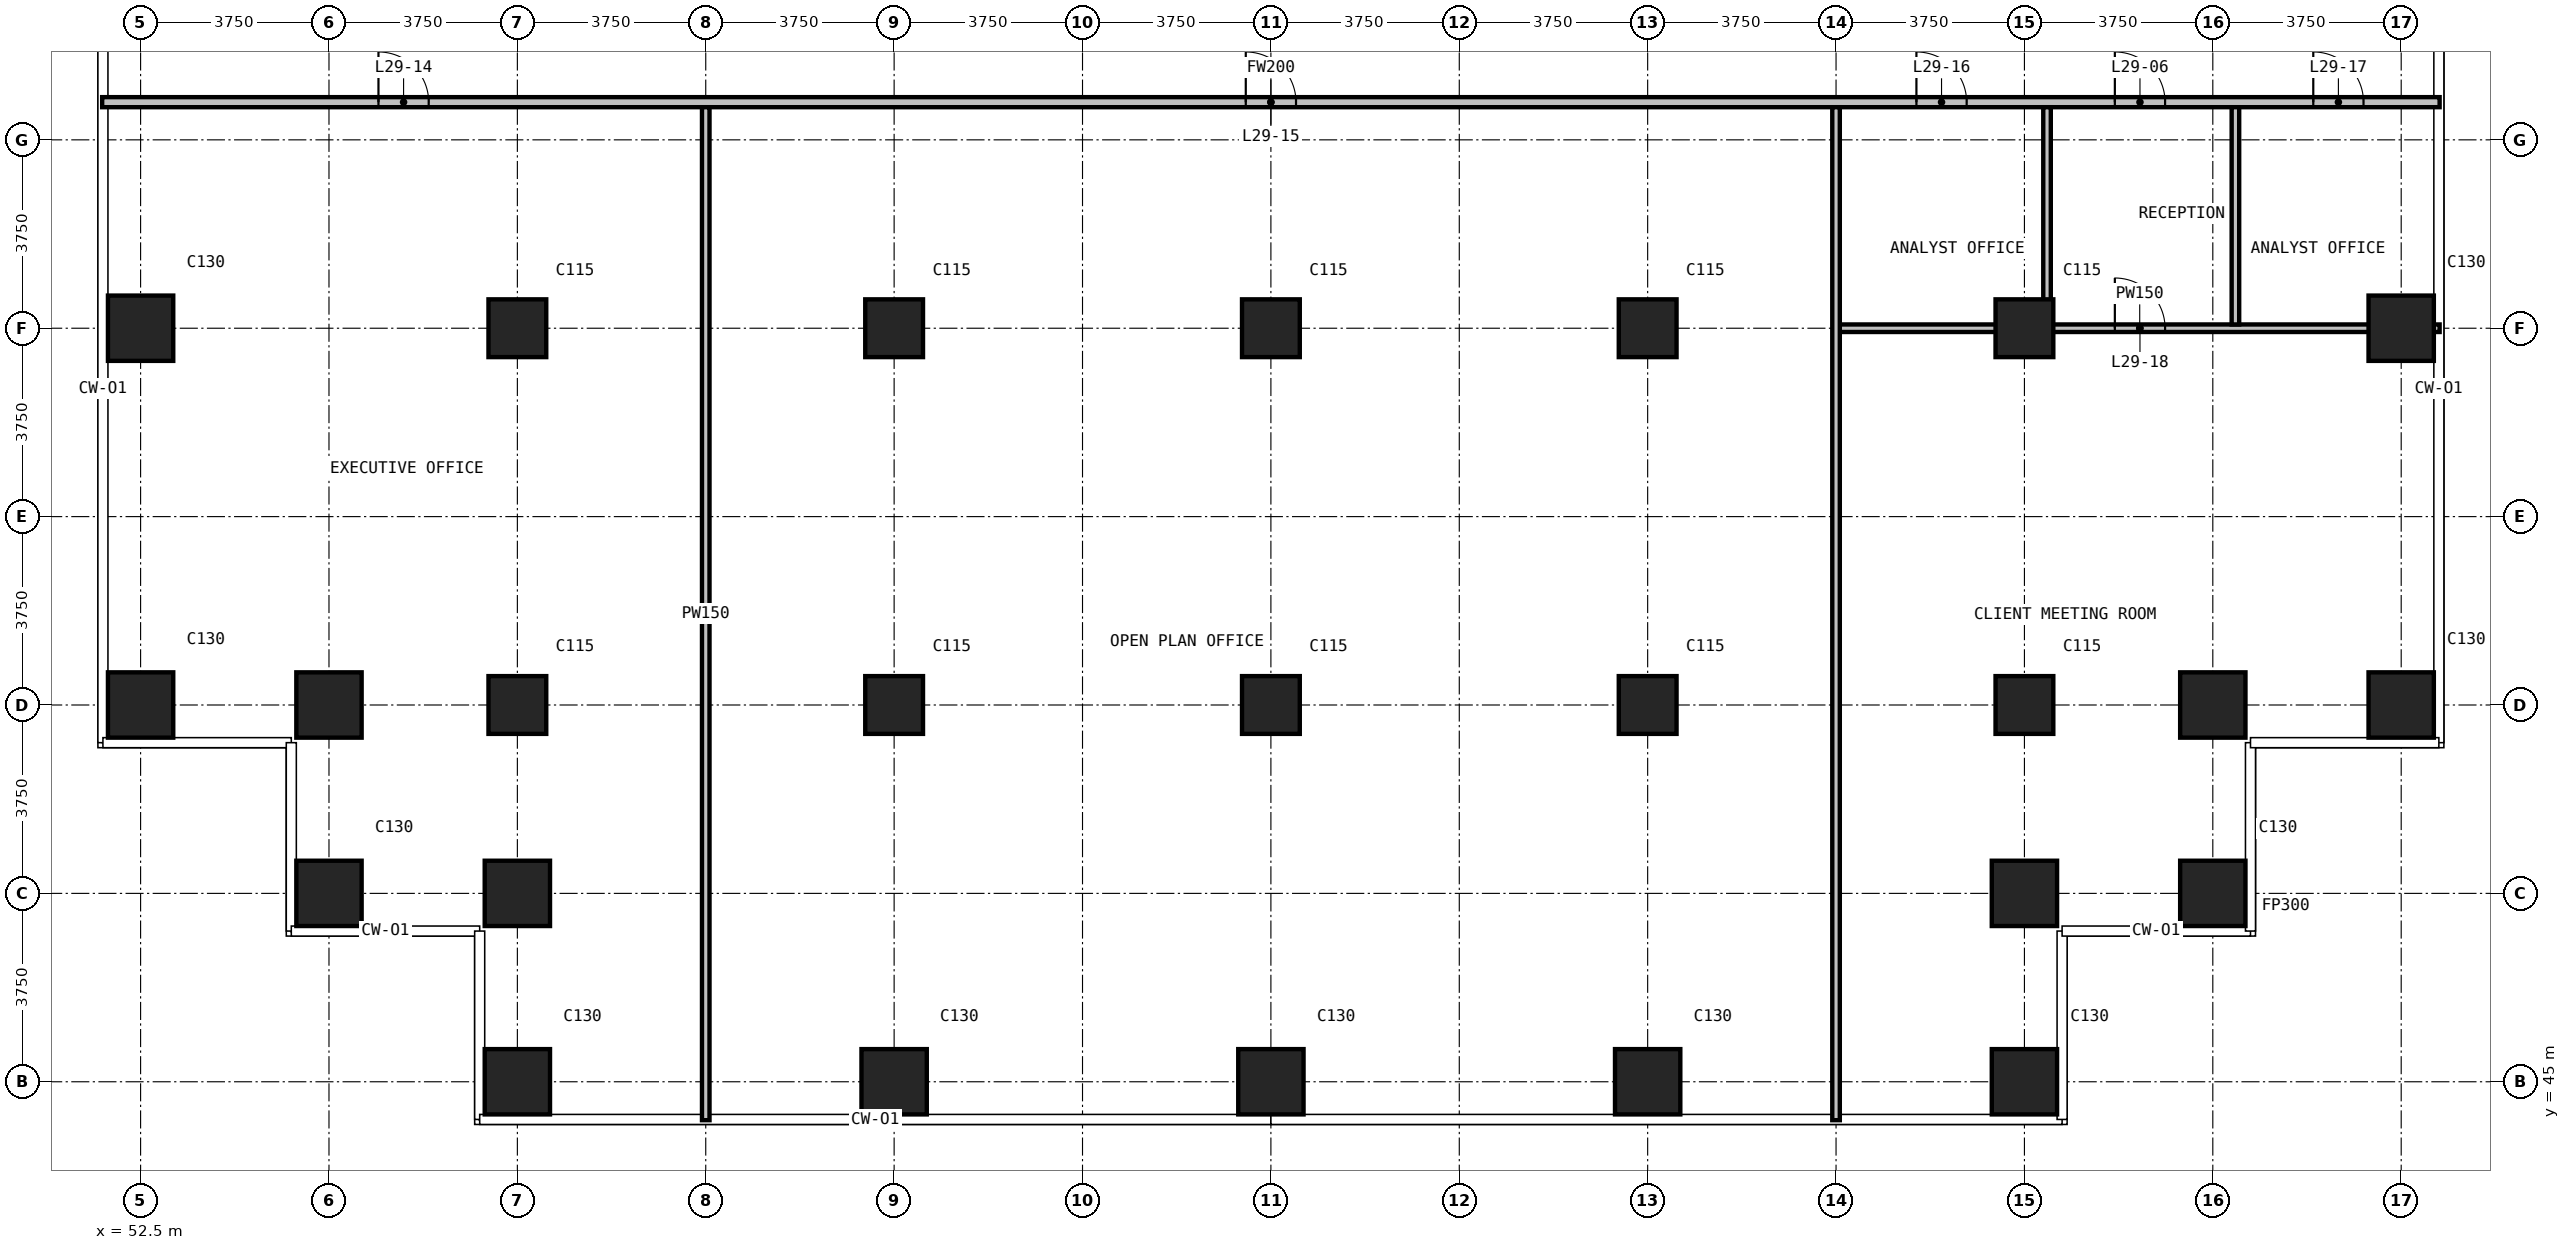
"""IFC4 building model, lengths in metres.
Left out: names, types, materials, properties, quantities, classifications, styles, units other than length and angle.
Written with IfcOpenShell. Run it as: python <this file> out.ifc"""

import sys

from ifc_helpers import new_model, si_unit, direction, frame, frame_2d, origin, origin_2d, place, context, subcontext, project, spatial, rectangle, extrude, element, fill, save


model = new_model("IFC4")
c1 = context("Model", 3, precision=1e-05, world=origin(), true_north=direction((0.0, 1.0)))
c2 = subcontext(c1, "Body", "Model", "MODEL_VIEW")
j1 = project(units=[si_unit("LENGTHUNIT", "METRE"), si_unit("PLANEANGLEUNIT", "RADIAN")], contexts=[c1])
p1 = place(None, origin())
s1 = spatial("IfcSite", under=j1, at=p1, CompositionType="ELEMENT")
p2 = place(p1, origin())
s2 = spatial("IfcBuilding", under=s1, at=p2, CompositionType="ELEMENT")
p3 = place(p2, frame((0.0, 0.0, 118.0)))
s3 = spatial("IfcBuildingStorey", under=s2, at=p3, CompositionType="ELEMENT", Elevation=118.0)
for number, where, z_axis, x_axis in (
    (1, (52.5, 52.5, 0.0), (0.0, 0.0, 1.0), (1.0, 0.0, 0.0)),
    (2, (52.5, 60.0, 0.0), (0.0, 0.0, 1.0), (1.0, 0.0, 0.0)),
    (3, (56.25, 48.75, 0.0), (0.0, 0.0, 1.0), (1.0, 0.0, 0.0)),
    (4, (56.25, 52.5, 0.0), (0.0, 0.0, 1.0), (1.0, 0.0, 0.0)),
    (5, (60.0, 45.0, 0.0), (0.0, 0.0, 1.0), (1.0, 0.0, 0.0)),
    (6, (60.0, 48.75, 0.0), (0.0, 0.0, 1.0), (1.0, 0.0, 0.0)),
):
    element("IfcColumn", number, at=place(p3, frame(where, z_axis=z_axis, x_axis=x_axis)), inside=s3, PredefinedType="COLUMN", context=c2, shape_type="SweptSolid", body=[
        extrude(rectangle(XDim=1.3, YDim=1.3, at=origin_2d()), origin(), (0.0, 0.0, 1.0), 3.6),
    ])
for number, where, z_axis, x_axis in (
    (7, (60.0, 52.5, 0.0), (0.0, 0.0, 1.0), (1.0, 0.0, 0.0)),
    (8, (60.0, 60.0, 0.0), (0.0, 0.0, 1.0), (1.0, 0.0, 0.0)),
):
    element("IfcColumn", number, at=place(p3, frame(where, z_axis=z_axis, x_axis=x_axis)), inside=s3, PredefinedType="COLUMN", context=c2, shape_type="SweptSolid", body=[
        extrude(rectangle(XDim=1.15, YDim=1.15, at=origin_2d()), origin(), (0.0, 0.0, 1.0), 3.6),
    ])
p4 = place(p3, frame((67.5, 45.0, 0.0), z_axis=(0.0, 0.0, 1.0), x_axis=(1.0, 0.0, 0.0)))
e9 = element("IfcColumn", 9, at=p4, inside=s3, PredefinedType="COLUMN", context=c2, shape_type="SweptSolid", body=[
    extrude(rectangle(XDim=1.3, YDim=1.3, at=origin_2d()), origin(), (0.0, 0.0, 1.0), 3.6),
])
for number, where, z_axis, x_axis in (
    (10, (67.5, 52.5, 0.0), (0.0, 0.0, 1.0), (1.0, 0.0, 0.0)),
    (11, (67.5, 60.0, 0.0), (0.0, 0.0, 1.0), (1.0, 0.0, 0.0)),
):
    element("IfcColumn", number, at=place(p3, frame(where, z_axis=z_axis, x_axis=x_axis)), inside=s3, PredefinedType="COLUMN", context=c2, shape_type="SweptSolid", body=[
        extrude(rectangle(XDim=1.15, YDim=1.15, at=origin_2d()), origin(), (0.0, 0.0, 1.0), 3.6),
    ])
p5 = place(p3, frame((75.0, 45.0, 0.0), z_axis=(0.0, 0.0, 1.0), x_axis=(1.0, 0.0, 0.0)))
e12 = element("IfcColumn", 12, at=p5, inside=s3, PredefinedType="COLUMN", context=c2, shape_type="SweptSolid", body=[
    extrude(rectangle(XDim=1.3, YDim=1.3, at=origin_2d()), origin(), (0.0, 0.0, 1.0), 3.6),
])
for number, where, z_axis, x_axis in (
    (13, (75.0, 52.5, 0.0), (0.0, 0.0, 1.0), (1.0, 0.0, 0.0)),
    (14, (75.0, 60.0, 0.0), (0.0, 0.0, 1.0), (1.0, 0.0, 0.0)),
):
    element("IfcColumn", number, at=place(p3, frame(where, z_axis=z_axis, x_axis=x_axis)), inside=s3, PredefinedType="COLUMN", context=c2, shape_type="SweptSolid", body=[
        extrude(rectangle(XDim=1.15, YDim=1.15, at=origin_2d()), origin(), (0.0, 0.0, 1.0), 3.6),
    ])
p6 = place(p3, frame((82.5, 45.0, 0.0), z_axis=(0.0, 0.0, 1.0), x_axis=(1.0, 0.0, 0.0)))
e15 = element("IfcColumn", 15, at=p6, inside=s3, PredefinedType="COLUMN", context=c2, shape_type="SweptSolid", body=[
    extrude(rectangle(XDim=1.3, YDim=1.3, at=origin_2d()), origin(), (0.0, 0.0, 1.0), 3.6),
])
for number, where, z_axis, x_axis in (
    (16, (82.5, 52.5, 0.0), (0.0, 0.0, 1.0), (1.0, 0.0, 0.0)),
    (17, (82.5, 60.0, 0.0), (0.0, 0.0, 1.0), (1.0, 0.0, 0.0)),
):
    element("IfcColumn", number, at=place(p3, frame(where, z_axis=z_axis, x_axis=x_axis)), inside=s3, PredefinedType="COLUMN", context=c2, shape_type="SweptSolid", body=[
        extrude(rectangle(XDim=1.15, YDim=1.15, at=origin_2d()), origin(), (0.0, 0.0, 1.0), 3.6),
    ])
for number, where, z_axis, x_axis in (
    (18, (90.0, 45.0, 0.0), (0.0, 0.0, 1.0), (1.0, 0.0, 0.0)),
    (19, (90.0, 48.75, 0.0), (0.0, 0.0, 1.0), (1.0, 0.0, 0.0)),
):
    element("IfcColumn", number, at=place(p3, frame(where, z_axis=z_axis, x_axis=x_axis)), inside=s3, PredefinedType="COLUMN", context=c2, shape_type="SweptSolid", body=[
        extrude(rectangle(XDim=1.3, YDim=1.3, at=origin_2d()), origin(), (0.0, 0.0, 1.0), 3.6),
    ])
for number, where, z_axis, x_axis in (
    (20, (90.0, 52.5, 0.0), (0.0, 0.0, 1.0), (1.0, 0.0, 0.0)),
    (21, (90.0, 60.0, 0.0), (0.0, 0.0, 1.0), (1.0, 0.0, 0.0)),
):
    element("IfcColumn", number, at=place(p3, frame(where, z_axis=z_axis, x_axis=x_axis)), inside=s3, PredefinedType="COLUMN", context=c2, shape_type="SweptSolid", body=[
        extrude(rectangle(XDim=1.15, YDim=1.15, at=origin_2d()), origin(), (0.0, 0.0, 1.0), 3.6),
    ])
for number, where, z_axis, x_axis in (
    (22, (93.75, 48.75, 0.0), (0.0, 0.0, 1.0), (1.0, 0.0, 0.0)),
    (23, (93.75, 52.5, 0.0), (0.0, 0.0, 1.0), (1.0, 0.0, 0.0)),
    (24, (97.5, 52.5, 0.0), (0.0, 0.0, 1.0), (1.0, 0.0, 0.0)),
    (25, (97.5, 60.0, 0.0), (0.0, 0.0, 1.0), (1.0, 0.0, 0.0)),
):
    element("IfcColumn", number, at=place(p3, frame(where, z_axis=z_axis, x_axis=x_axis)), inside=s3, PredefinedType="COLUMN", context=c2, shape_type="SweptSolid", body=[
        extrude(rectangle(XDim=1.3, YDim=1.3, at=origin_2d()), origin(), (0.0, 0.0, 1.0), 3.6),
    ])
p7 = place(p3, frame((51.735, 64.5, 0.0), z_axis=(0.0, 0.0, 1.0), x_axis=(1.0, 0.0, 0.0)))
e26 = element("IfcWall", 26, at=p7, inside=s3, PredefinedType="PARTITIONING", context=c2, shape_type="SweptSolid", body=[
    extrude(rectangle(XDim=46.53, YDim=0.2, at=frame_2d((23.265, 0.0))), origin(), (0.0, 0.0, 1.0), 3.3),
])
p8 = place(p7, frame((40.065, 0.0, 0.0)))
e27 = element("IfcOpeningElement", 27, at=p8, cuts=e26, PredefinedType="OPENING", context=c2, shape_type="SweptSolid", body=[
    extrude(rectangle(XDim=1.0, YDim=2.2, at=frame_2d((0.5, 1.1))), frame((0.0, 0.11, 0.0), z_axis=(0.0, -1.0, 0.0), x_axis=(1.0, 0.0, 0.0)), (0.0, 0.0, 1.0), 0.22),
])
p9 = place(p7, frame((5.5, 0.0, 0.0)))
e28 = element("IfcOpeningElement", 28, at=p9, cuts=e26, PredefinedType="OPENING", context=c2, shape_type="SweptSolid", body=[
    extrude(rectangle(XDim=1.0, YDim=2.2, at=frame_2d((0.5, 1.1))), frame((0.0, 0.11, 0.0), z_axis=(0.0, -1.0, 0.0), x_axis=(1.0, 0.0, 0.0)), (0.0, 0.0, 1.0), 0.22),
])
p10 = place(p7, frame((22.765, 0.0, 0.0)))
e29 = element("IfcOpeningElement", 29, at=p10, cuts=e26, PredefinedType="OPENING", context=c2, shape_type="SweptSolid", body=[
    extrude(rectangle(XDim=1.0, YDim=2.2, at=frame_2d((0.5, 1.1))), frame((0.0, 0.11, 0.0), z_axis=(0.0, -1.0, 0.0), x_axis=(1.0, 0.0, 0.0)), (0.0, 0.0, 1.0), 0.22),
])
p11 = place(p7, frame((36.115, 0.0, 0.0)))
e30 = element("IfcOpeningElement", 30, at=p11, cuts=e26, PredefinedType="OPENING", context=c2, shape_type="SweptSolid", body=[
    extrude(rectangle(XDim=1.0, YDim=2.2, at=frame_2d((0.5, 1.1))), frame((0.0, 0.11, 0.0), z_axis=(0.0, -1.0, 0.0), x_axis=(1.0, 0.0, 0.0)), (0.0, 0.0, 1.0), 0.22),
])
p12 = place(p7, frame((44.015, 0.0, 0.0)))
e31 = element("IfcOpeningElement", 31, at=p12, cuts=e26, PredefinedType="OPENING", context=c2, shape_type="SweptSolid", body=[
    extrude(rectangle(XDim=1.0, YDim=2.2, at=frame_2d((0.5, 1.1))), frame((0.0, 0.11, 0.0), z_axis=(0.0, -1.0, 0.0), x_axis=(1.0, 0.0, 0.0)), (0.0, 0.0, 1.0), 0.22),
])
p13 = place(p3, frame((86.325, 60.0, 0.0), z_axis=(0.0, 0.0, 1.0), x_axis=(1.0, 0.0, 0.0)))
e32 = element("IfcWall", 32, at=p13, inside=s3, PredefinedType="PARTITIONING", context=c2, shape_type="SweptSolid", body=[
    extrude(rectangle(XDim=11.94, YDim=0.15, at=frame_2d((5.97, 0.0))), origin(), (0.0, 0.0, 1.0), 3.3),
])
p14 = place(p13, frame((5.475, 0.0, 0.0)))
e33 = element("IfcOpeningElement", 33, at=p14, cuts=e32, PredefinedType="OPENING", context=c2, shape_type="SweptSolid", body=[
    extrude(rectangle(XDim=1.0, YDim=2.2, at=frame_2d((0.5, 1.1))), frame((0.0, 0.085, 0.0), z_axis=(0.0, -1.0, 0.0), x_axis=(1.0, 0.0, 0.0)), (0.0, 0.0, 1.0), 0.17),
])
for number, where, z_axis, x_axis in (
    (34, (63.75, 44.235, 0.0), (0.0, 0.0, 1.0), (0.0, 1.0, 0.0)),
    (35, (86.25, 44.235, 0.0), (0.0, 0.0, 1.0), (0.0, 1.0, 0.0)),
):
    element("IfcWall", number, at=place(p3, frame(where, z_axis=z_axis, x_axis=x_axis)), inside=s3, PredefinedType="PARTITIONING", context=c2, shape_type="SweptSolid", body=[
        extrude(rectangle(XDim=20.165, YDim=0.15, at=frame_2d((10.083, 0.0))), origin(), (0.0, 0.0, 1.0), 3.3),
    ])
for number, where, z_axis, x_axis in (
    (36, (90.45, 60.075, 0.0), (0.0, 0.0, 1.0), (0.0, 1.0, 0.0)),
    (37, (94.2, 60.075, 0.0), (0.0, 0.0, 1.0), (0.0, 1.0, 0.0)),
):
    element("IfcWall", number, at=place(p3, frame(where, z_axis=z_axis, x_axis=x_axis)), inside=s3, PredefinedType="PARTITIONING", context=c2, shape_type="SweptSolid", body=[
        extrude(rectangle(XDim=4.325, YDim=0.15, at=frame_2d((2.163, 0.0))), origin(), (0.0, 0.0, 1.0), 3.3),
    ])
p15 = place(p8, origin())
e38 = element("IfcDoor", 38, at=p15, inside=s3, OperationType="SINGLE_SWING_RIGHT", PredefinedType="DOOR", context=c2, shape_type="SweptSolid", body=[
    extrude(rectangle(XDim=1.0, YDim=2.2, at=frame_2d((0.5, 1.1))), frame((0.0, 0.025, 0.0), z_axis=(0.0, -1.0, 0.0), x_axis=(1.0, 0.0, 0.0)), (0.0, 0.0, 1.0), 0.05),
])
fill(e27, e38)
p16 = place(p9, origin())
e39 = element("IfcDoor", 39, at=p16, inside=s3, OperationType="SINGLE_SWING_LEFT", PredefinedType="DOOR", context=c2, shape_type="SweptSolid", body=[
    extrude(rectangle(XDim=1.0, YDim=2.2, at=frame_2d((0.5, 1.1))), frame((0.0, 0.025, 0.0), z_axis=(0.0, -1.0, 0.0), x_axis=(1.0, 0.0, 0.0)), (0.0, 0.0, 1.0), 0.05),
])
fill(e28, e39)
p17 = place(p10, origin())
e40 = element("IfcDoor", 40, at=p17, inside=s3, OperationType="SINGLE_SWING_RIGHT", PredefinedType="DOOR", context=c2, shape_type="SweptSolid", body=[
    extrude(rectangle(XDim=1.0, YDim=2.2, at=frame_2d((0.5, 1.1))), frame((0.0, 0.025, 0.0), z_axis=(0.0, -1.0, 0.0), x_axis=(1.0, 0.0, 0.0)), (0.0, 0.0, 1.0), 0.05),
])
fill(e29, e40)
p18 = place(p11, origin())
e41 = element("IfcDoor", 41, at=p18, inside=s3, OperationType="SINGLE_SWING_LEFT", PredefinedType="DOOR", context=c2, shape_type="SweptSolid", body=[
    extrude(rectangle(XDim=1.0, YDim=2.2, at=frame_2d((0.5, 1.1))), frame((0.0, 0.025, 0.0), z_axis=(0.0, -1.0, 0.0), x_axis=(1.0, 0.0, 0.0)), (0.0, 0.0, 1.0), 0.05),
])
fill(e30, e41)
p19 = place(p12, origin())
e42 = element("IfcDoor", 42, at=p19, inside=s3, OperationType="SINGLE_SWING_RIGHT", PredefinedType="DOOR", context=c2, shape_type="SweptSolid", body=[
    extrude(rectangle(XDim=1.0, YDim=2.2, at=frame_2d((0.5, 1.1))), frame((0.0, 0.025, 0.0), z_axis=(0.0, -1.0, 0.0), x_axis=(1.0, 0.0, 0.0)), (0.0, 0.0, 1.0), 0.05),
])
fill(e31, e42)
p20 = place(p14, origin())
e43 = element("IfcDoor", 43, at=p20, inside=s3, OperationType="SINGLE_SWING_RIGHT", PredefinedType="DOOR", context=c2, shape_type="SweptSolid", body=[
    extrude(rectangle(XDim=1.0, YDim=2.2, at=frame_2d((0.5, 1.1))), frame((0.0, 0.025, 0.0), z_axis=(0.0, -1.0, 0.0), x_axis=(1.0, 0.0, 0.0)), (0.0, 0.0, 1.0), 0.05),
])
fill(e33, e43)
save(model, sys.argv[1])
